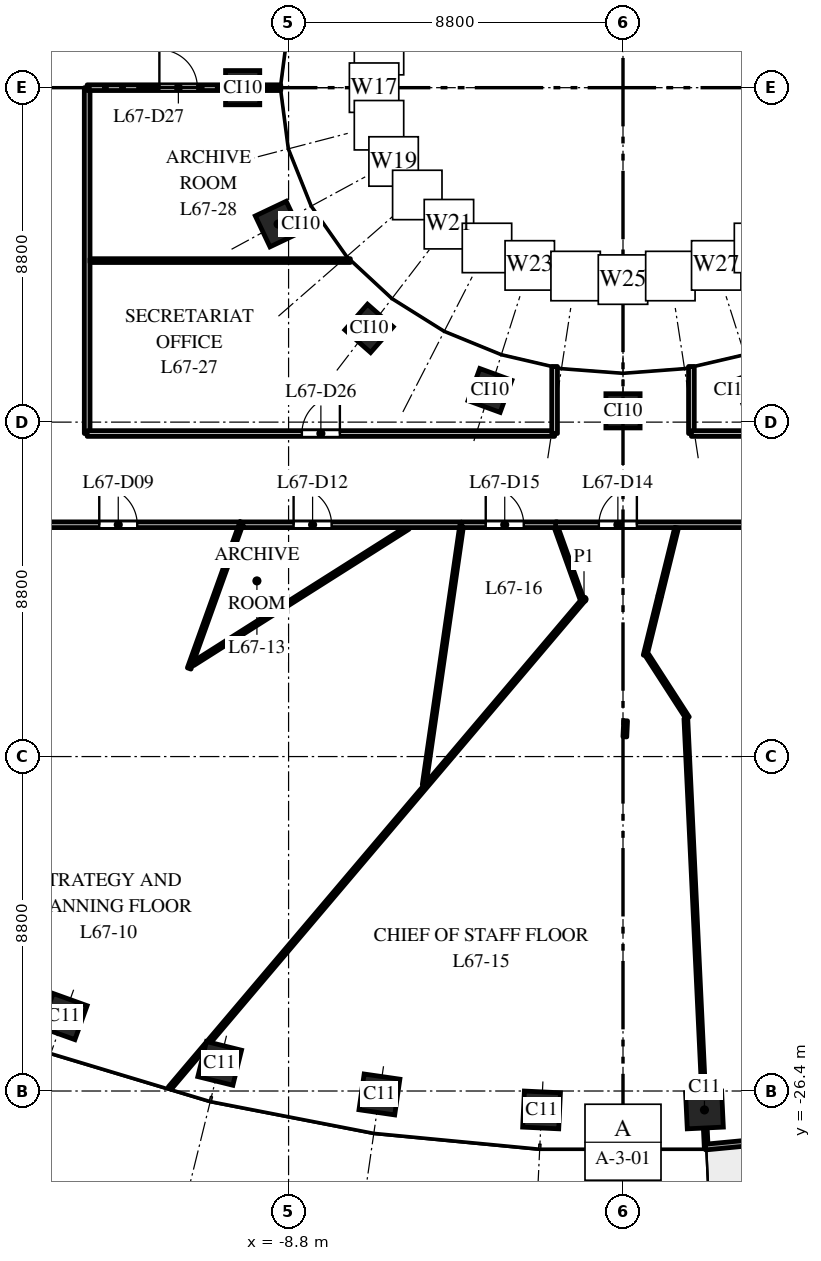
"""IFC4 building model, lengths in metres.
Left out: names, types, materials, properties, quantities, classifications, styles, units other than length and angle.
Written with IfcOpenShell. Run it as: python <this file> out.ifc"""

import sys

from ifc_helpers import new_model, si_unit, direction, frame, frame_2d, origin, origin_2d, place, context, subcontext, project, spatial, rectangle, extrude, element, fill, save


model = new_model("IFC4")
c1 = context("Model", 3, precision=1e-05, world=origin(), true_north=direction((0.0, 1.0)))
c2 = subcontext(c1, "Body", "Model", "MODEL_VIEW")
j1 = project(units=[si_unit("LENGTHUNIT", "METRE"), si_unit("PLANEANGLEUNIT", "RADIAN")], contexts=[c1])
p1 = place(None, origin())
s1 = spatial("IfcSite", under=j1, at=p1, CompositionType="ELEMENT")
p2 = place(p1, origin())
s2 = spatial("IfcBuilding", under=s1, at=p2, CompositionType="ELEMENT")
p3 = place(p2, frame((0.0, 0.0, 311.0)))
s3 = spatial("IfcBuildingStorey", under=s2, at=p3, CompositionType="ELEMENT", Elevation=311.0)
for number, where, z_axis, x_axis in (
    (1, (-14.709, -24.441, 0.0), (0.0, 0.0, 1.0), (0.941, -0.338, 0.0)),
    (2, (-10.613, -25.674, 0.0), (0.0, 0.0, 1.0), (0.971, -0.24, 0.0)),
    (3, (-6.409, -26.491, 0.0), (0.0, 0.0, 1.0), (0.99, -0.143, 0.0)),
    (4, (-2.143, -26.898, 0.0), (0.0, 0.0, 1.0), (0.999, -0.048, 0.0)),
    (5, (2.143, -26.898, 0.0), (0.0, 0.0, 1.0), (0.999, 0.048, 0.0)),
):
    element("IfcColumn", number, at=place(p3, frame(where, z_axis=z_axis, x_axis=x_axis)), inside=s3, PredefinedType="COLUMN", context=c2, shape_type="SweptSolid", body=[
        extrude(rectangle(XDim=0.95, YDim=0.95, at=origin_2d()), origin(), (0.0, 0.0, 1.0), 4.0),
    ])
for number, where, z_axis, x_axis in (
    (6, (-10.008, 0.0, 0.0), (0.0, 0.0, 1.0), (0.0, -1.0, 0.0)),
    (7, (-9.076, -3.588, 0.0), (0.0, 0.0, 1.0), (0.429, -0.903, 0.0)),
    (8, (-6.682, -6.334, 0.0), (0.0, 0.0, 1.0), (0.751, -0.66, 0.0)),
    (9, (-3.501, -7.967, 0.0), (0.0, 0.0, 1.0), (0.939, -0.344, 0.0)),
    (10, (0.0, -8.503, 0.0), (0.0, 0.0, 1.0), (1.0, 0.0, 0.0)),
    (11, (3.501, -7.967, 0.0), (0.0, 0.0, 1.0), (0.939, 0.344, 0.0)),
):
    element("IfcColumn", number, at=place(p3, frame(where, z_axis=z_axis, x_axis=x_axis)), inside=s3, PredefinedType="COLUMN", context=c2, shape_type="SweptSolid", body=[
        extrude(rectangle(XDim=0.9, YDim=0.9, at=origin_2d()), origin(), (0.0, 0.0, 1.0), 4.0),
    ])
p4 = place(p3, frame((2.166, -27.875, 0.0), z_axis=(0.0, 0.0, 1.0), x_axis=(0.995473879823, 0.095035543824, 0.0)))
e12 = element("IfcWall", 12, at=p4, inside=s3, PredefinedType="STANDARD", context=c2, shape_type="SweptSolid", body=[
    extrude(rectangle(XDim=4.426, YDim=0.15, at=frame_2d((2.213, 0.0))), origin(), (0.0, 0.0, 1.0), 3.7),
])
p5 = place(p4, frame((1.713, 0.0, 0.0)))
e13 = element("IfcOpeningElement", 13, at=p5, cuts=e12, PredefinedType="OPENING", context=c2, shape_type="SweptSolid", body=[
    extrude(rectangle(XDim=1.0, YDim=2.4, at=frame_2d((0.5, 1.2))), frame((0.0, 0.085, 0.0), z_axis=(0.0, -1.0, 0.0), x_axis=(1.0, 0.0, 0.0)), (0.0, 0.0, 1.0), 0.17),
])
p6 = place(p3, frame((-31.5, -11.5, 0.0), z_axis=(0.0, 0.0, 1.0), x_axis=(1.0, 0.0, 0.0)))
e14 = element("IfcWall", 14, at=p6, inside=s3, PredefinedType="PARTITIONING", context=c2, shape_type="SweptSolid", body=[
    extrude(rectangle(XDim=21.432, YDim=0.15, at=frame_2d((10.716, 0.0))), origin(), (0.0, 0.0, 1.0), 2.75),
])
p7 = place(p6, frame((7.15, 0.0, 0.0)))
e15 = element("IfcOpeningElement", 15, at=p7, cuts=e14, PredefinedType="OPENING", context=c2, shape_type="SweptSolid", body=[
    extrude(rectangle(XDim=1.0, YDim=2.1, at=frame_2d((0.5, 1.05))), frame((0.0, 0.085, 0.0), z_axis=(0.0, -1.0, 0.0), x_axis=(1.0, 0.0, 0.0)), (0.0, 0.0, 1.0), 0.17),
])
p8 = place(p6, frame((17.718, 0.0, 0.0)))
e16 = element("IfcOpeningElement", 16, at=p8, cuts=e14, PredefinedType="OPENING", context=c2, shape_type="SweptSolid", body=[
    extrude(rectangle(XDim=1.0, YDim=2.1, at=frame_2d((0.5, 1.05))), frame((0.0, 0.085, 0.0), z_axis=(0.0, -1.0, 0.0), x_axis=(1.0, 0.0, 0.0)), (0.0, 0.0, 1.0), 0.17),
])
p9 = place(p3, frame((-14.1, -9.1, 0.0), z_axis=(0.0, 0.0, 1.0), x_axis=(0.0, 1.0, 0.0)))
e17 = element("IfcWall", 17, at=p9, inside=s3, PredefinedType="PARTITIONING", context=c2, shape_type="SweptSolid", body=[
    extrude(rectangle(XDim=9.1, YDim=0.15, at=frame_2d((4.55, 0.0))), origin(), (0.0, 0.0, 1.0), 3.7),
])
p10 = place(p3, frame((-14.1, -9.1, 0.0), z_axis=(0.0, 0.0, 1.0), x_axis=(1.0, 0.0, 0.0)))
e18 = element("IfcWall", 18, at=p10, inside=s3, PredefinedType="PARTITIONING", context=c2, shape_type="SweptSolid", body=[
    extrude(rectangle(XDim=12.3, YDim=0.15, at=frame_2d((6.15, 0.0))), origin(), (0.0, 0.0, 1.0), 2.75),
])
p11 = place(p10, frame((5.65, 0.0, 0.0)))
e19 = element("IfcOpeningElement", 19, at=p11, cuts=e18, PredefinedType="OPENING", context=c2, shape_type="SweptSolid", body=[
    extrude(rectangle(XDim=1.0, YDim=2.1, at=frame_2d((0.5, 1.05))), frame((0.0, 0.085, 0.0), z_axis=(0.0, -1.0, 0.0), x_axis=(1.0, 0.0, 0.0)), (0.0, 0.0, 1.0), 0.17),
])
p12 = place(p3, frame((-14.025, -4.55, 0.0), z_axis=(0.0, 0.0, 1.0), x_axis=(1.0, 0.0, 0.0)))
e20 = element("IfcWall", 20, at=p12, inside=s3, PredefinedType="PARTITIONING", context=c2, shape_type="SweptSolid", body=[
    extrude(rectangle(XDim=6.851, YDim=0.1, at=frame_2d((3.425, 0.0))), origin(), (0.0, 0.0, 1.0), 3.0),
])
p13 = place(p3, frame((-14.1, 0.0, 0.0), z_axis=(0.0, 0.0, 1.0), x_axis=(1.0, 0.0, 0.0)))
e21 = element("IfcWall", 21, at=p13, inside=s3, PredefinedType="PARTITIONING", context=c2, shape_type="SweptSolid", body=[
    extrude(rectangle(XDim=5.095, YDim=0.15, at=frame_2d((2.548, 0.0))), origin(), (0.0, 0.0, 1.0), 3.7),
])
p14 = place(p13, frame((1.9, 0.0, 0.0)))
e22 = element("IfcOpeningElement", 22, at=p14, cuts=e21, PredefinedType="OPENING", context=c2, shape_type="SweptSolid", body=[
    extrude(rectangle(XDim=1.0, YDim=2.1, at=frame_2d((0.5, 1.05))), frame((0.0, 0.085, 0.0), z_axis=(0.0, -1.0, 0.0), x_axis=(1.0, 0.0, 0.0)), (0.0, 0.0, 1.0), 0.17),
])
p15 = place(p3, frame((-11.925, -26.323, 0.0), z_axis=(0.0, 0.0, 1.0), x_axis=(0.646491267329, 0.762921386034, 0.0)))
e23 = element("IfcWall", 23, at=p15, inside=s3, PredefinedType="PARTITIONING", context=c2, shape_type="SweptSolid", body=[
    extrude(rectangle(XDim=16.859, YDim=0.1, at=frame_2d((8.429, 0.0))), origin(), (0.0, 0.0, 1.0), 2.85),
])
p16 = place(p3, frame((-11.416, -15.282, 0.0), z_axis=(0.0, 0.0, 1.0), x_axis=(0.33848088015, 0.940973269425, 0.0)))
e24 = element("IfcWall", 24, at=p16, inside=s3, PredefinedType="PARTITIONING", context=c2, shape_type="SweptSolid", body=[
    extrude(rectangle(XDim=4.095, YDim=0.1, at=frame_2d((2.047, 0.0))), origin(), (0.0, 0.0, 1.0), 2.75),
])
p17 = place(p3, frame((-11.319, -15.161, 0.0), z_axis=(0.0, 0.0, 1.0), x_axis=(0.844865171483, 0.534979291203, 0.0)))
e25 = element("IfcWall", 25, at=p17, inside=s3, PredefinedType="PARTITIONING", context=c2, shape_type="SweptSolid", body=[
    extrude(rectangle(XDim=6.703, YDim=0.1, at=frame_2d((3.352, 0.0))), origin(), (0.0, 0.0, 1.0), 3.7),
])
p18 = place(p3, frame((-10.003, -11.5, 0.0), z_axis=(0.0, 0.0, 1.0), x_axis=(1.0, 0.0, 0.0)))
e26 = element("IfcWall", 26, at=p18, inside=s3, PredefinedType="PARTITIONING", context=c2, shape_type="SweptSolid", body=[
    extrude(rectangle(XDim=5.741, YDim=0.15, at=frame_2d((2.871, 0.0))), origin(), (0.0, 0.0, 1.0), 2.75),
])
p19 = place(p18, frame((1.335, 0.0, 0.0)))
e27 = element("IfcOpeningElement", 27, at=p19, cuts=e26, PredefinedType="OPENING", context=c2, shape_type="SweptSolid", body=[
    extrude(rectangle(XDim=1.0, YDim=2.1, at=frame_2d((0.5, 1.05))), frame((0.0, 0.085, 0.0), z_axis=(0.0, -1.0, 0.0), x_axis=(1.0, 0.0, 0.0)), (0.0, 0.0, 1.0), 0.17),
])
p20 = place(p3, frame((-5.232, -18.347, 0.0), z_axis=(0.0, 0.0, 1.0), x_axis=(0.143100956717, 0.989708096454, 0.0)))
e28 = element("IfcWall", 28, at=p20, inside=s3, PredefinedType="PARTITIONING", context=c2, shape_type="SweptSolid", body=[
    extrude(rectangle(XDim=6.918, YDim=0.1, at=frame_2d((3.459, 0.0))), origin(), (0.0, 0.0, 1.0), 3.7),
])
p21 = place(p3, frame((-4.242, -11.5, 0.0), z_axis=(0.0, 0.0, 1.0), x_axis=(1.0, 0.0, 0.0)))
e29 = element("IfcWall", 29, at=p21, inside=s3, PredefinedType="PARTITIONING", context=c2, shape_type="SweptSolid", body=[
    extrude(rectangle(XDim=2.51, YDim=0.15, at=frame_2d((1.255, 0.0))), origin(), (0.0, 0.0, 1.0), 3.7),
])
p22 = place(p21, frame((0.63, 0.0, 0.0)))
e30 = element("IfcOpeningElement", 30, at=p22, cuts=e29, PredefinedType="OPENING", context=c2, shape_type="SweptSolid", body=[
    extrude(rectangle(XDim=1.0, YDim=2.1, at=frame_2d((0.5, 1.05))), frame((0.0, 0.085, 0.0), z_axis=(0.0, -1.0, 0.0), x_axis=(1.0, 0.0, 0.0)), (0.0, 0.0, 1.0), 0.17),
])
p23 = place(p3, frame((-1.8, -9.1, 0.0), z_axis=(0.0, 0.0, 1.0), x_axis=(0.0, 1.0, 0.0)))
e31 = element("IfcWall", 31, at=p23, inside=s3, PredefinedType="PARTITIONING", context=c2, shape_type="SweptSolid", body=[
    extrude(rectangle(XDim=1.764, YDim=0.15, at=frame_2d((0.882, 0.0))), origin(), (0.0, 0.0, 1.0), 3.0),
])
p24 = place(p3, frame((-1.757, -11.579, 0.0), z_axis=(0.0, 0.0, 1.0), x_axis=(0.338380447297, -0.941009390435, 0.0)))
e32 = element("IfcWall", 32, at=p24, inside=s3, PredefinedType="PARTITIONING", context=c2, shape_type="SweptSolid", body=[
    extrude(rectangle(XDim=1.989, YDim=0.1, at=frame_2d((0.995, 0.0))), origin(), (0.0, 0.0, 1.0), 2.85),
])
p25 = place(p3, frame((-1.774, -11.5, 0.0), z_axis=(0.0, 0.0, 1.0), x_axis=(1.0, 0.0, 0.0)))
e33 = element("IfcWall", 33, at=p25, inside=s3, PredefinedType="PARTITIONING", context=c2, shape_type="SweptSolid", body=[
    extrude(rectangle(XDim=8.886, YDim=0.15, at=frame_2d((4.443, 0.0))), origin(), (0.0, 0.0, 1.0), 2.85),
])
p26 = place(p25, frame((1.139, 0.0, 0.0)))
e34 = element("IfcOpeningElement", 34, at=p26, cuts=e33, PredefinedType="OPENING", context=c2, shape_type="SweptSolid", body=[
    extrude(rectangle(XDim=1.0, YDim=2.1, at=frame_2d((0.5, 1.05))), frame((0.0, 0.085, 0.0), z_axis=(0.0, -1.0, 0.0), x_axis=(1.0, 0.0, 0.0)), (0.0, 0.0, 1.0), 0.17),
])
p27 = place(p25, frame((5.577, 0.0, 0.0)))
e35 = element("IfcOpeningElement", 35, at=p27, cuts=e33, PredefinedType="OPENING", context=c2, shape_type="SweptSolid", body=[
    extrude(rectangle(XDim=1.0, YDim=2.1, at=frame_2d((0.5, 1.05))), frame((0.0, 0.085, 0.0), z_axis=(0.0, -1.0, 0.0), x_axis=(1.0, 0.0, 0.0)), (0.0, 0.0, 1.0), 0.17),
])
p28 = place(p3, frame((0.049, -17.081, 0.0), z_axis=(0.0, 0.0, 1.0), x_axis=(0.047263912187, 0.998882436829, 0.0)))
e36 = element("IfcWall", 36, at=p28, inside=s3, PredefinedType="PARTITIONING", context=c2, shape_type="SweptSolid", body=[
    extrude(rectangle(XDim=0.424, YDim=0.1, at=frame_2d((0.212, 0.0))), origin(), (0.0, 0.0, 1.0), 3.7),
])
p29 = place(p3, frame((0.582, -14.941, 0.0), z_axis=(0.0, 0.0, 1.0), x_axis=(0.239198168936, 0.970970769888, 0.0)))
e37 = element("IfcWall", 37, at=p29, inside=s3, PredefinedType="PARTITIONING", context=c2, shape_type="SweptSolid", body=[
    extrude(rectangle(XDim=1.601, YDim=0.1, at=frame_2d((0.801, 0.0))), origin(), (0.0, 0.0, 1.0), 3.7),
])
p30 = place(p3, frame((0.635, -14.932, 0.0), z_axis=(0.0, 0.0, 1.0), x_axis=(0.542268183011, -0.840205461595, 0.0)))
e38 = element("IfcWall", 38, at=p30, inside=s3, PredefinedType="PARTITIONING", context=c2, shape_type="SweptSolid", body=[
    extrude(rectangle(XDim=1.968, YDim=0.1, at=frame_2d((0.984, 0.0))), origin(), (0.0, 0.0, 1.0), 3.7),
])
p31 = place(p3, frame((0.969, -13.369, 0.0), z_axis=(0.0, 0.0, 1.0), x_axis=(0.239699020522, 0.970847248315, 0.0)))
e39 = element("IfcWall", 39, at=p31, inside=s3, PredefinedType="PARTITIONING", context=c2, shape_type="SweptSolid", body=[
    extrude(rectangle(XDim=1.844, YDim=0.1, at=frame_2d((0.922, 0.0))), origin(), (0.0, 0.0, 1.0), 3.7),
])
p32 = place(p3, frame((1.654, -16.601, 0.0), z_axis=(0.0, 0.0, 1.0), x_axis=(0.047383612141, -0.998876765823, 0.0)))
e40 = element("IfcWall", 40, at=p32, inside=s3, PredefinedType="PARTITIONING", context=c2, shape_type="SweptSolid", body=[
    extrude(rectangle(XDim=11.31, YDim=0.1, at=frame_2d((5.655, 0.0))), origin(), (0.0, 0.0, 1.0), 3.0),
])
p33 = place(p3, frame((1.8, -9.1, 0.0), z_axis=(0.0, 0.0, 1.0), x_axis=(0.0, 1.0, 0.0)))
e41 = element("IfcWall", 41, at=p33, inside=s3, PredefinedType="PARTITIONING", context=c2, shape_type="SweptSolid", body=[
    extrude(rectangle(XDim=1.764, YDim=0.15, at=frame_2d((0.882, 0.0))), origin(), (0.0, 0.0, 1.0), 3.0),
])
p34 = place(p3, frame((1.8, -9.1, 0.0), z_axis=(0.0, 0.0, 1.0), x_axis=(1.0, 0.0, 0.0)))
e42 = element("IfcWall", 42, at=p34, inside=s3, PredefinedType="PARTITIONING", context=c2, shape_type="SweptSolid", body=[
    extrude(rectangle(XDim=12.3, YDim=0.15, at=frame_2d((6.15, 0.0))), origin(), (0.0, 0.0, 1.0), 2.85),
])
p35 = place(p34, frame((5.65, 0.0, 0.0)))
e43 = element("IfcOpeningElement", 43, at=p35, cuts=e42, PredefinedType="OPENING", context=c2, shape_type="SweptSolid", body=[
    extrude(rectangle(XDim=1.0, YDim=2.1, at=frame_2d((0.5, 1.05))), frame((0.0, 0.085, 0.0), z_axis=(0.0, -1.0, 0.0), x_axis=(1.0, 0.0, 0.0)), (0.0, 0.0, 1.0), 0.17),
])
p36 = place(p8, origin())
e44 = element("IfcDoor", 44, at=p36, inside=s3, OperationType="SINGLE_SWING_LEFT", PredefinedType="DOOR", context=c2, shape_type="SweptSolid", body=[
    extrude(rectangle(XDim=1.0, YDim=2.1, at=frame_2d((0.5, 1.05))), frame((0.0, 0.025, 0.0), z_axis=(0.0, -1.0, 0.0), x_axis=(1.0, 0.0, 0.0)), (0.0, 0.0, 1.0), 0.05),
])
fill(e16, e44)
p37 = place(p19, origin())
e45 = element("IfcDoor", 45, at=p37, inside=s3, OperationType="SINGLE_SWING_LEFT", PredefinedType="DOOR", context=c2, shape_type="SweptSolid", body=[
    extrude(rectangle(XDim=1.0, YDim=2.1, at=frame_2d((0.5, 1.05))), frame((0.0, 0.025, 0.0), z_axis=(0.0, -1.0, 0.0), x_axis=(1.0, 0.0, 0.0)), (0.0, 0.0, 1.0), 0.05),
])
fill(e27, e45)
p38 = place(p26, origin())
e46 = element("IfcDoor", 46, at=p38, inside=s3, OperationType="SINGLE_SWING_RIGHT", PredefinedType="DOOR", context=c2, shape_type="SweptSolid", body=[
    extrude(rectangle(XDim=1.0, YDim=2.1, at=frame_2d((0.5, 1.05))), frame((0.0, 0.025, 0.0), z_axis=(0.0, -1.0, 0.0), x_axis=(1.0, 0.0, 0.0)), (0.0, 0.0, 1.0), 0.05),
])
fill(e34, e46)
p39 = place(p22, origin())
e47 = element("IfcDoor", 47, at=p39, inside=s3, OperationType="SINGLE_SWING_LEFT", PredefinedType="DOOR", context=c2, shape_type="SweptSolid", body=[
    extrude(rectangle(XDim=1.0, YDim=2.1, at=frame_2d((0.5, 1.05))), frame((0.0, 0.025, 0.0), z_axis=(0.0, -1.0, 0.0), x_axis=(1.0, 0.0, 0.0)), (0.0, 0.0, 1.0), 0.05),
])
fill(e30, e47)
p40 = place(p11, origin())
e48 = element("IfcDoor", 48, at=p40, inside=s3, OperationType="SINGLE_SWING_RIGHT", PredefinedType="DOOR", context=c2, shape_type="SweptSolid", body=[
    extrude(rectangle(XDim=1.0, YDim=2.1, at=frame_2d((0.5, 1.05))), frame((0.0, 0.025, 0.0), z_axis=(0.0, -1.0, 0.0), x_axis=(1.0, 0.0, 0.0)), (0.0, 0.0, 1.0), 0.05),
])
fill(e19, e48)
p41 = place(p14, origin())
e49 = element("IfcDoor", 49, at=p41, inside=s3, OperationType="SINGLE_SWING_LEFT", PredefinedType="DOOR", context=c2, shape_type="SweptSolid", body=[
    extrude(rectangle(XDim=1.0, YDim=2.1, at=frame_2d((0.5, 1.05))), frame((0.0, 0.025, 0.0), z_axis=(0.0, -1.0, 0.0), x_axis=(1.0, 0.0, 0.0)), (0.0, 0.0, 1.0), 0.05),
])
fill(e22, e49)
save(model, sys.argv[1])
